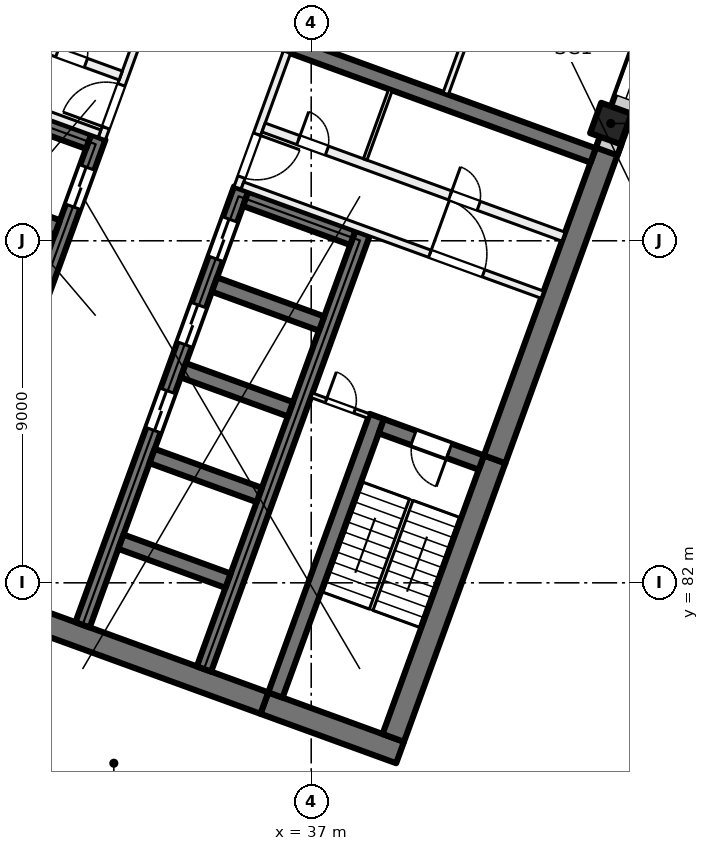
"""IFC4 building model, lengths in metres.
Left out: names, types, materials, properties, quantities, classifications, styles, units other than length and angle.
Written with IfcOpenShell. Run it as: python <this file> out.ifc"""

import sys

from ifc_helpers import new_model, si_unit, direction, frame, frame_2d, origin, origin_2d, place, context, subcontext, project, spatial, rectangle, extrude, element, fill, save


model = new_model("IFC4")
c1 = context("Model", 3, precision=1e-05, world=origin(), true_north=direction((0.0, 1.0)))
c2 = subcontext(c1, "Body", "Model", "MODEL_VIEW")
j1 = project(units=[si_unit("LENGTHUNIT", "METRE"), si_unit("PLANEANGLEUNIT", "RADIAN")], contexts=[c1])
p1 = place(None, origin())
s1 = spatial("IfcSite", under=j1, at=p1, CompositionType="ELEMENT")
p2 = place(p1, origin())
s2 = spatial("IfcBuilding", under=s1, at=p2, CompositionType="ELEMENT")
p3 = place(p2, frame((0.0, 0.0, 117.0)))
s3 = spatial("IfcBuildingStorey", under=s2, at=p3, CompositionType="ELEMENT", Elevation=117.0)
p4 = place(p3, frame((44.884, 94.087, 0.0), z_axis=(0.0, 0.0, 1.0), x_axis=(-0.342020143326, -0.939692620786, 0.0)))
e1 = element("IfcColumn", 1, at=p4, inside=s3, PredefinedType="COLUMN", context=c2, shape_type="SweptSolid", body=[
    extrude(rectangle(XDim=0.85, YDim=0.85, at=origin_2d()), origin(), (0.0, 0.0, 1.0), 4.0),
])
p5 = place(p3, frame((39.338, 77.535, 0.0), z_axis=(0.0, 0.0, 1.0), x_axis=(-0.939701471648, 0.341995824804, 0.0)))
e2 = element("IfcWall", 2, at=p5, inside=s3, PredefinedType="SHEAR", context=c2, shape_type="SweptSolid", body=[
    extrude(rectangle(XDim=3.8, YDim=0.6, at=frame_2d((1.9, 0.0))), origin(), (0.0, 0.0, 1.0), 4.0),
])
p6 = place(p3, frame((35.767, 78.835, 0.0), z_axis=(0.0, 0.0, 1.0), x_axis=(-0.939692894512, 0.342019391267, 0.0)))
e3 = element("IfcWall", 3, at=p6, inside=s3, PredefinedType="SHEAR", context=c2, shape_type="SweptSolid", body=[
    extrude(rectangle(XDim=14.4, YDim=0.6, at=frame_2d((7.2, 0.0))), origin(), (0.0, 0.0, 1.0), 4.0),
])
p7 = place(p3, frame((39.159, 77.92, 0.0), z_axis=(0.0, 0.0, 1.0), x_axis=(0.342016982193, 0.939693771338, 0.0)))
e4 = element("IfcWall", 4, at=p7, inside=s3, PredefinedType="SHEAR", context=c2, shape_type="SweptSolid", body=[
    extrude(rectangle(XDim=7.8, YDim=0.6, at=frame_2d((3.9, 0.0))), origin(), (0.0, 0.0, 1.0), 4.0),
])
p8 = place(p3, frame((41.827, 85.249, 0.0), z_axis=(0.0, 0.0, 1.0), x_axis=(0.342017595281, 0.939693548195, 0.0)))
e5 = element("IfcWall", 5, at=p8, inside=s3, PredefinedType="SHEAR", context=c2, shape_type="SweptSolid", body=[
    extrude(rectangle(XDim=8.925, YDim=0.6, at=frame_2d((4.462, 0.0))), origin(), (0.0, 0.0, 1.0), 4.0),
])
p9 = place(p3, frame((36.058, 79.048, 0.0), z_axis=(0.0, 0.0, 1.0), x_axis=(0.342016982193, 0.939693771338, 0.0)))
e6 = element("IfcWall", 6, at=p9, inside=s3, PredefinedType="SHEAR", context=c2, shape_type="SweptSolid", body=[
    extrude(rectangle(XDim=7.8, YDim=0.4, at=frame_2d((3.9, 0.0))), origin(), (0.0, 0.0, 1.0), 4.0),
])
p10 = place(p3, frame((41.476, 85.164, 0.0), z_axis=(0.0, 0.0, 1.0), x_axis=(-0.939678810556, 0.342058084236, 0.0)))
e7 = element("IfcWall", 7, at=p10, inside=s3, PredefinedType="SHEAR", context=c2, shape_type="SweptSolid", body=[
    extrude(rectangle(XDim=2.8, YDim=0.4, at=frame_2d((1.4, 0.0))), origin(), (0.0, 0.0, 1.0), 4.0),
])
p11 = place(p10, frame((0.9, 0.0, 0.0)))
e8 = element("IfcOpeningElement", 8, at=p11, cuts=e7, PredefinedType="OPENING", context=c2, shape_type="SweptSolid", body=[
    extrude(rectangle(XDim=1.0, YDim=2.1, at=frame_2d((0.5, 1.05))), frame((0.0, 0.21, 0.0), z_axis=(0.0, -1.0, 0.0), x_axis=(1.0, 0.0, 0.0)), (0.0, 0.0, 1.0), 0.42),
])
p12 = place(p3, frame((30.984, 80.895, 0.0), z_axis=(0.0, 0.0, 1.0), x_axis=(0.342021021735, 0.939692301071, 0.0)))
e9 = element("IfcWall", 9, at=p12, inside=s3, PredefinedType="SHEAR", context=c2, shape_type="SweptSolid", body=[
    extrude(rectangle(XDim=12.2, YDim=0.4, at=frame_2d((6.1, 0.0))), origin(), (0.0, 0.0, 1.0), 4.0),
])
p13 = place(p12, frame((5.45, 0.0, 0.0)))
e10 = element("IfcOpeningElement", 10, at=p13, cuts=e9, PredefinedType="OPENING", context=c2, shape_type="SweptSolid", body=[
    extrude(rectangle(XDim=1.1, YDim=2.1, at=frame_2d((0.55, 1.05))), frame((0.0, 0.21, 0.0), z_axis=(0.0, -1.0, 0.0), x_axis=(1.0, 0.0, 0.0)), (0.0, 0.0, 1.0), 0.42),
])
p14 = place(p12, frame((7.85, 0.0, 0.0)))
e11 = element("IfcOpeningElement", 11, at=p14, cuts=e9, PredefinedType="OPENING", context=c2, shape_type="SweptSolid", body=[
    extrude(rectangle(XDim=1.1, YDim=2.1, at=frame_2d((0.55, 1.05))), frame((0.0, 0.21, 0.0), z_axis=(0.0, -1.0, 0.0), x_axis=(1.0, 0.0, 0.0)), (0.0, 0.0, 1.0), 0.42),
])
p15 = place(p12, frame((10.25, 0.0, 0.0)))
e12 = element("IfcOpeningElement", 12, at=p15, cuts=e9, PredefinedType="OPENING", context=c2, shape_type="SweptSolid", body=[
    extrude(rectangle(XDim=1.1, YDim=2.1, at=frame_2d((0.55, 1.05))), frame((0.0, 0.21, 0.0), z_axis=(0.0, -1.0, 0.0), x_axis=(1.0, 0.0, 0.0)), (0.0, 0.0, 1.0), 0.42),
])
p16 = place(p3, frame((34.178, 79.732, 0.0), z_axis=(0.0, 0.0, 1.0), x_axis=(0.342014590177, 0.939694641948, 0.0)))
e13 = element("IfcWall", 13, at=p16, inside=s3, PredefinedType="SHEAR", context=c2, shape_type="SweptSolid", body=[
    extrude(rectangle(XDim=12.2, YDim=0.4, at=frame_2d((6.1, 0.0))), origin(), (0.0, 0.0, 1.0), 4.0),
])
for number, where, z_axis, x_axis in (
    (14, (34.812, 82.056, 0.0), (0.0, 0.0, 1.0), (-0.94, 0.342, 0.0)),
    (15, (35.632, 84.311, 0.0), (0.0, 0.0, 1.0), (-0.94, 0.342, 0.0)),
    (16, (36.453, 86.566, 0.0), (0.0, 0.0, 1.0), (-0.94, 0.342, 0.0)),
    (17, (37.274, 88.822, 0.0), (0.0, 0.0, 1.0), (-0.94, 0.342, 0.0)),
):
    element("IfcWall", number, at=place(p3, frame(where, z_axis=z_axis, x_axis=x_axis)), inside=s3, PredefinedType="SHEAR", context=c2, shape_type="SweptSolid", body=[
        extrude(rectangle(XDim=3.0, YDim=0.4, at=frame_2d((1.5, 0.0))), origin(), (0.0, 0.0, 1.0), 4.0),
    ])
p17 = place(p3, frame((38.095, 91.077, 0.0), z_axis=(0.0, 0.0, 1.0), x_axis=(-0.939676934218, 0.342063238742, 0.0)))
e18 = element("IfcWall", 18, at=p17, inside=s3, PredefinedType="SHEAR", context=c2, shape_type="SweptSolid", body=[
    extrude(rectangle(XDim=3.0, YDim=0.4, at=frame_2d((1.5, 0.0))), origin(), (0.0, 0.0, 1.0), 4.0),
])
p18 = place(p3, frame((27.225, 82.263, 0.0), z_axis=(0.0, 0.0, 1.0), x_axis=(0.342014590177, 0.939694641948, 0.0)))
e19 = element("IfcWall", 19, at=p18, inside=s3, PredefinedType="SHEAR", context=c2, shape_type="SweptSolid", body=[
    extrude(rectangle(XDim=12.2, YDim=0.4, at=frame_2d((6.1, 0.0))), origin(), (0.0, 0.0, 1.0), 4.0),
])
p19 = place(p18, frame((10.25, 0.0, 0.0)))
e20 = element("IfcOpeningElement", 20, at=p19, cuts=e19, PredefinedType="OPENING", context=c2, shape_type="SweptSolid", body=[
    extrude(rectangle(XDim=1.1, YDim=2.1, at=frame_2d((0.55, 1.05))), frame((0.0, 0.21, 0.0), z_axis=(0.0, -1.0, 0.0), x_axis=(1.0, 0.0, 0.0)), (0.0, 0.0, 1.0), 0.42),
])
p20 = place(p18, frame((0.6, 0.0, 0.0)))
e21 = element("IfcOpeningElement", 21, at=p20, cuts=e19, PredefinedType="OPENING", context=c2, shape_type="SweptSolid", body=[
    extrude(rectangle(XDim=1.0, YDim=2.1, at=frame_2d((0.5, 1.05))), frame((0.0, 0.21, 0.0), z_axis=(0.0, -1.0, 0.0), x_axis=(1.0, 0.0, 0.0)), (0.0, 0.0, 1.0), 0.42),
])
for number, where, z_axis, x_axis in (
    (22, (30.32, 91.353, 0.0), (0.0, 0.0, 1.0), (-0.94, 0.342, 0.0)),
    (23, (31.141, 93.608, 0.0), (0.0, 0.0, 1.0), (-0.94, 0.342, 0.0)),
):
    element("IfcWall", number, at=place(p3, frame(where, z_axis=z_axis, x_axis=x_axis)), inside=s3, PredefinedType="SHEAR", context=c2, shape_type="SweptSolid", body=[
        extrude(rectangle(XDim=3.0, YDim=0.4, at=frame_2d((1.5, 0.0))), origin(), (0.0, 0.0, 1.0), 4.0),
    ])
p21 = place(p3, frame((44.418, 93.245, 0.0), z_axis=(0.0, 0.0, 1.0), x_axis=(-0.93969060187, 0.342025690201, 0.0)))
e24 = element("IfcWall", 24, at=p21, inside=s3, PredefinedType="SHEAR", context=c2, shape_type="SweptSolid", body=[
    extrude(rectangle(XDim=8.6, YDim=0.4, at=frame_2d((4.3, 0.0))), origin(), (0.0, 0.0, 1.0), 4.0),
])
p22 = place(p3, frame((52.212, 113.783, 0.0), z_axis=(0.0, 0.0, 1.0), x_axis=(-0.34202521188, -0.939690775968, 0.0)))
e25 = element("IfcWall", 25, at=p22, inside=s3, PredefinedType="SOLIDWALL", context=c2, shape_type="SweptSolid", body=[
    extrude(rectangle(XDim=21.745, YDim=0.6, at=frame_2d((10.873, 0.0))), origin(), (0.0, 0.0, 1.0), 3.625),
])
p23 = place(p22, frame((4.365, 0.0, 0.0)))
e26 = element("IfcOpeningElement", 26, at=p23, cuts=e25, PredefinedType="OPENING", context=c2, shape_type="SweptSolid", body=[
    extrude(rectangle(XDim=1.8, YDim=2.4, at=frame_2d((0.9, 1.2))), frame((0.0, 0.31, 0.0), z_axis=(0.0, -1.0, 0.0), x_axis=(1.0, 0.0, 0.0)), (0.0, 0.0, 1.0), 0.62),
])
p24 = place(p22, frame((8.265, 0.0, 0.9)))
e27 = element("IfcOpeningElement", 27, at=p24, cuts=e25, PredefinedType="OPENING", context=c2, shape_type="SweptSolid", body=[
    extrude(rectangle(XDim=3.0, YDim=2.4, at=frame_2d((1.5, 1.2))), frame((0.0, 0.31, 0.0), z_axis=(0.0, -1.0, 0.0), x_axis=(1.0, 0.0, 0.0)), (0.0, 0.0, 1.0), 0.62),
])
p25 = place(p22, frame((12.765, 0.0, 0.9)))
e28 = element("IfcOpeningElement", 28, at=p25, cuts=e25, PredefinedType="OPENING", context=c2, shape_type="SweptSolid", body=[
    extrude(rectangle(XDim=3.0, YDim=2.4, at=frame_2d((1.5, 1.2))), frame((0.0, 0.31, 0.0), z_axis=(0.0, -1.0, 0.0), x_axis=(1.0, 0.0, 0.0)), (0.0, 0.0, 1.0), 0.62),
])
p26 = place(p22, frame((17.265, 0.0, 0.9)))
e29 = element("IfcOpeningElement", 29, at=p26, cuts=e25, PredefinedType="OPENING", context=c2, shape_type="SweptSolid", body=[
    extrude(rectangle(XDim=3.0, YDim=2.4, at=frame_2d((1.5, 1.2))), frame((0.0, 0.31, 0.0), z_axis=(0.0, -1.0, 0.0), x_axis=(1.0, 0.0, 0.0)), (0.0, 0.0, 1.0), 0.62),
])
p27 = place(p3, frame((31.491, 93.693, 0.0), z_axis=(0.0, 0.0, 1.0), x_axis=(0.341995824804, 0.939701471648, 0.0)))
e30 = element("IfcWall", 30, at=p27, inside=s3, PredefinedType="PARTITIONING", context=c2, shape_type="SweptSolid", body=[
    extrude(rectangle(XDim=3.8, YDim=0.2, at=frame_2d((1.9, 0.0))), origin(), (0.0, 0.0, 1.0), 3.625),
])
p28 = place(p27, frame((0.3, 0.0, 0.0)))
e31 = element("IfcOpeningElement", 31, at=p28, cuts=e30, PredefinedType="OPENING", context=c2, shape_type="SweptSolid", body=[
    extrude(rectangle(XDim=1.2, YDim=2.1, at=frame_2d((0.6, 1.05))), frame((0.0, 0.11, 0.0), z_axis=(0.0, -1.0, 0.0), x_axis=(1.0, 0.0, 0.0)), (0.0, 0.0, 1.0), 0.22),
])
p29 = place(p3, frame((23.538, 96.694, 0.0), z_axis=(0.0, 0.0, 1.0), x_axis=(0.939691552312, -0.342023078919, 0.0)))
e32 = element("IfcWall", 32, at=p29, inside=s3, PredefinedType="PARTITIONING", context=c2, shape_type="SweptSolid", body=[
    extrude(rectangle(XDim=8.4, YDim=0.2, at=frame_2d((4.2, 0.0))), origin(), (0.0, 0.0, 1.0), 3.625),
])
p30 = place(p29, frame((1.65, 0.0, 0.0)))
e33 = element("IfcOpeningElement", 33, at=p30, cuts=e32, PredefinedType="OPENING", context=c2, shape_type="SweptSolid", body=[
    extrude(rectangle(XDim=1.5, YDim=2.1, at=frame_2d((0.75, 1.05))), frame((0.0, 0.11, 0.0), z_axis=(0.0, -1.0, 0.0), x_axis=(1.0, 0.0, 0.0)), (0.0, 0.0, 1.0), 0.22),
])
p31 = place(p3, frame((24.094, 98.221, 0.0), z_axis=(0.0, 0.0, 1.0), x_axis=(0.939691552312, -0.342023078919, 0.0)))
e34 = element("IfcWall", 34, at=p31, inside=s3, PredefinedType="PARTITIONING", context=c2, shape_type="SweptSolid", body=[
    extrude(rectangle(XDim=8.4, YDim=0.25, at=frame_2d((4.2, 0.0))), origin(), (0.0, 0.0, 1.0), 3.625),
])
p32 = place(p31, frame((6.625, 0.0, 0.0)))
e35 = element("IfcOpeningElement", 35, at=p32, cuts=e34, PredefinedType="OPENING", context=c2, shape_type="SweptSolid", body=[
    extrude(rectangle(XDim=0.8, YDim=2.1, at=frame_2d((0.4, 1.05))), frame((0.0, 0.135, 0.0), z_axis=(0.0, -1.0, 0.0), x_axis=(1.0, 0.0, 0.0)), (0.0, 0.0, 1.0), 0.27),
])
p33 = place(p31, frame((2.375, 0.0, 0.0)))
e36 = element("IfcOpeningElement", 36, at=p33, cuts=e34, PredefinedType="OPENING", context=c2, shape_type="SweptSolid", body=[
    extrude(rectangle(XDim=0.8, YDim=2.1, at=frame_2d((0.4, 1.05))), frame((0.0, 0.135, 0.0), z_axis=(0.0, -1.0, 0.0), x_axis=(1.0, 0.0, 0.0)), (0.0, 0.0, 1.0), 0.27),
])
p34 = place(p3, frame((36.362, 95.964, 0.0), z_axis=(0.0, 0.0, 1.0), x_axis=(-0.341995824804, -0.939701471648, 0.0)))
e37 = element("IfcWall", 37, at=p34, inside=s3, PredefinedType="PARTITIONING", context=c2, shape_type="SweptSolid", body=[
    extrude(rectangle(XDim=3.8, YDim=0.2, at=frame_2d((1.9, 0.0))), origin(), (0.0, 0.0, 1.0), 3.625),
])
p35 = place(p34, frame((2.3, 0.0, 0.0)))
e38 = element("IfcOpeningElement", 38, at=p35, cuts=e37, PredefinedType="OPENING", context=c2, shape_type="SweptSolid", body=[
    extrude(rectangle(XDim=1.2, YDim=2.1, at=frame_2d((0.6, 1.05))), frame((0.0, 0.11, 0.0), z_axis=(0.0, -1.0, 0.0), x_axis=(1.0, 0.0, 0.0)), (0.0, 0.0, 1.0), 0.22),
])
p36 = place(p3, frame((35.19, 92.453, 0.0), z_axis=(0.0, 0.0, 1.0), x_axis=(0.939691552312, -0.342023078919, 0.0)))
e39 = element("IfcWall", 39, at=p36, inside=s3, PredefinedType="PARTITIONING", context=c2, shape_type="SweptSolid", body=[
    extrude(rectangle(XDim=8.4, YDim=0.2, at=frame_2d((4.2, 0.0))), origin(), (0.0, 0.0, 1.0), 3.625),
])
p37 = place(p36, frame((5.25, 0.0, 0.0)))
e40 = element("IfcOpeningElement", 40, at=p37, cuts=e39, PredefinedType="OPENING", context=c2, shape_type="SweptSolid", body=[
    extrude(rectangle(XDim=1.5, YDim=2.1, at=frame_2d((0.75, 1.05))), frame((0.0, 0.11, 0.0), z_axis=(0.0, -1.0, 0.0), x_axis=(1.0, 0.0, 0.0)), (0.0, 0.0, 1.0), 0.22),
])
p38 = place(p3, frame((35.746, 93.98, 0.0), z_axis=(0.0, 0.0, 1.0), x_axis=(0.939691552312, -0.342023078919, 0.0)))
e41 = element("IfcWall", 41, at=p38, inside=s3, PredefinedType="PARTITIONING", context=c2, shape_type="SweptSolid", body=[
    extrude(rectangle(XDim=8.4, YDim=0.25, at=frame_2d((4.2, 0.0))), origin(), (0.0, 0.0, 1.0), 3.625),
])
p39 = place(p38, frame((0.975, 0.0, 0.0)))
e42 = element("IfcOpeningElement", 42, at=p39, cuts=e41, PredefinedType="OPENING", context=c2, shape_type="SweptSolid", body=[
    extrude(rectangle(XDim=0.8, YDim=2.1, at=frame_2d((0.4, 1.05))), frame((0.0, 0.135, 0.0), z_axis=(0.0, -1.0, 0.0), x_axis=(1.0, 0.0, 0.0)), (0.0, 0.0, 1.0), 0.27),
])
p40 = place(p38, frame((5.225, 0.0, 0.0)))
e43 = element("IfcOpeningElement", 43, at=p40, cuts=e41, PredefinedType="OPENING", context=c2, shape_type="SweptSolid", body=[
    extrude(rectangle(XDim=0.8, YDim=2.1, at=frame_2d((0.4, 1.05))), frame((0.0, 0.135, 0.0), z_axis=(0.0, -1.0, 0.0), x_axis=(1.0, 0.0, 0.0)), (0.0, 0.0, 1.0), 0.27),
])
p41 = place(p3, frame((37.013, 86.935, 0.0), z_axis=(0.0, 0.0, 1.0), x_axis=(0.939659694648, -0.342110593602, 0.0)))
e44 = element("IfcWall", 44, at=p41, inside=s3, PredefinedType="PARTITIONING", context=c2, shape_type="SweptSolid", body=[
    extrude(rectangle(XDim=1.6, YDim=0.125, at=frame_2d((0.8, 0.0))), origin(), (0.0, 0.0, 1.0), 3.625),
])
p42 = place(p41, frame((0.4, 0.0, 0.0)))
e45 = element("IfcOpeningElement", 45, at=p42, cuts=e44, PredefinedType="OPENING", context=c2, shape_type="SweptSolid", body=[
    extrude(rectangle(XDim=0.8, YDim=2.1, at=frame_2d((0.4, 1.05))), frame((0.0, 0.073, 0.0), z_axis=(0.0, -1.0, 0.0), x_axis=(1.0, 0.0, 0.0)), (0.0, 0.0, 1.0), 0.145),
])
p43 = place(p3, frame((39.087, 94.973, 0.0), z_axis=(0.0, 0.0, 1.0), x_axis=(-0.342024501273, -0.939691034611, 0.0)))
e46 = element("IfcWall", 46, at=p43, inside=s3, PredefinedType="PARTITIONING", context=c2, shape_type="SweptSolid", body=[
    extrude(rectangle(XDim=1.95, YDim=0.1, at=frame_2d((0.975, 0.0))), origin(), (0.0, 0.0, 1.0), 3.625),
])
p44 = place(p3, frame((40.539, 94.87, 0.0), z_axis=(0.0, 0.0, 1.0), x_axis=(0.342082231415, 0.939670020247, 0.0)))
e47 = element("IfcWall", 47, at=p44, inside=s3, PredefinedType="PARTITIONING", context=c2, shape_type="SweptSolid", body=[
    extrude(rectangle(XDim=9.825, YDim=0.15, at=frame_2d((4.912, 0.0))), origin(), (0.0, 0.0, 1.0), 3.625),
])
p45 = place(p44, frame((2.125, 0.0, 0.0)))
e48 = element("IfcOpeningElement", 48, at=p45, cuts=e47, PredefinedType="OPENING", context=c2, shape_type="SweptSolid", body=[
    extrude(rectangle(XDim=1.0, YDim=2.1, at=frame_2d((0.5, 1.05))), frame((0.0, 0.085, 0.0), z_axis=(0.0, -1.0, 0.0), x_axis=(1.0, 0.0, 0.0)), (0.0, 0.0, 1.0), 0.17),
])
p46 = place(p44, frame((7.0, 0.0, 0.0)))
e49 = element("IfcOpeningElement", 49, at=p46, cuts=e47, PredefinedType="OPENING", context=c2, shape_type="SweptSolid", body=[
    extrude(rectangle(XDim=1.0, YDim=2.1, at=frame_2d((0.5, 1.05))), frame((0.0, 0.085, 0.0), z_axis=(0.0, -1.0, 0.0), x_axis=(1.0, 0.0, 0.0)), (0.0, 0.0, 1.0), 0.17),
])
p47 = place(p26, origin())
e50 = element("IfcWindow", 50, at=p47, inside=s3, PartitioningType="SINGLE_PANEL", PredefinedType="WINDOW", context=c2, shape_type="SweptSolid", body=[
    extrude(rectangle(XDim=3.0, YDim=2.4, at=frame_2d((1.5, 1.2))), frame((0.0, 0.03, 0.0), z_axis=(0.0, -1.0, 0.0), x_axis=(1.0, 0.0, 0.0)), (0.0, 0.0, 1.0), 0.06),
])
fill(e29, e50)
p48 = place(p19, origin())
e51 = element("IfcDoor", 51, at=p48, inside=s3, OperationType="DOUBLE_DOOR_SLIDING", PredefinedType="DOOR", context=c2, shape_type="SweptSolid", body=[
    extrude(rectangle(XDim=1.1, YDim=2.1, at=frame_2d((0.55, 1.05))), frame((0.0, 0.025, 0.0), z_axis=(0.0, -1.0, 0.0), x_axis=(1.0, 0.0, 0.0)), (0.0, 0.0, 1.0), 0.05),
])
fill(e20, e51)
p49 = place(p13, origin())
e52 = element("IfcDoor", 52, at=p49, inside=s3, OperationType="DOUBLE_DOOR_SLIDING", PredefinedType="DOOR", context=c2, shape_type="SweptSolid", body=[
    extrude(rectangle(XDim=1.1, YDim=2.1, at=frame_2d((0.55, 1.05))), frame((0.0, 0.025, 0.0), z_axis=(0.0, -1.0, 0.0), x_axis=(1.0, 0.0, 0.0)), (0.0, 0.0, 1.0), 0.05),
])
fill(e10, e52)
p50 = place(p14, origin())
e53 = element("IfcDoor", 53, at=p50, inside=s3, OperationType="DOUBLE_DOOR_SLIDING", PredefinedType="DOOR", context=c2, shape_type="SweptSolid", body=[
    extrude(rectangle(XDim=1.1, YDim=2.1, at=frame_2d((0.55, 1.05))), frame((0.0, 0.025, 0.0), z_axis=(0.0, -1.0, 0.0), x_axis=(1.0, 0.0, 0.0)), (0.0, 0.0, 1.0), 0.05),
])
fill(e11, e53)
p51 = place(p15, origin())
e54 = element("IfcDoor", 54, at=p51, inside=s3, OperationType="DOUBLE_DOOR_SLIDING", PredefinedType="DOOR", context=c2, shape_type="SweptSolid", body=[
    extrude(rectangle(XDim=1.1, YDim=2.1, at=frame_2d((0.55, 1.05))), frame((0.0, 0.025, 0.0), z_axis=(0.0, -1.0, 0.0), x_axis=(1.0, 0.0, 0.0)), (0.0, 0.0, 1.0), 0.05),
])
fill(e12, e54)
p52 = place(p28, origin())
e55 = element("IfcDoor", 55, at=p52, inside=s3, OperationType="DOUBLE_DOOR_SINGLE_SWING", PredefinedType="DOOR", context=c2, shape_type="SweptSolid", body=[
    extrude(rectangle(XDim=1.2, YDim=2.1, at=frame_2d((0.6, 1.05))), frame((0.0, 0.025, 0.0), z_axis=(0.0, -1.0, 0.0), x_axis=(1.0, 0.0, 0.0)), (0.0, 0.0, 1.0), 0.05),
])
fill(e31, e55)
p53 = place(p32, origin())
e56 = element("IfcDoor", 56, at=p53, inside=s3, OperationType="SINGLE_SWING_LEFT", PredefinedType="DOOR", context=c2, shape_type="SweptSolid", body=[
    extrude(rectangle(XDim=0.8, YDim=2.1, at=frame_2d((0.4, 1.05))), frame((0.0, 0.025, 0.0), z_axis=(0.0, -1.0, 0.0), x_axis=(1.0, 0.0, 0.0)), (0.0, 0.0, 1.0), 0.05),
])
fill(e35, e56)
p54 = place(p35, origin())
e57 = element("IfcDoor", 57, at=p54, inside=s3, OperationType="DOUBLE_DOOR_SINGLE_SWING", PredefinedType="DOOR", context=c2, shape_type="SweptSolid", body=[
    extrude(rectangle(XDim=1.2, YDim=2.1, at=frame_2d((0.6, 1.05))), frame((0.0, 0.025, 0.0), z_axis=(0.0, -1.0, 0.0), x_axis=(1.0, 0.0, 0.0)), (0.0, 0.0, 1.0), 0.05),
])
fill(e38, e57)
p55 = place(p37, origin())
e58 = element("IfcDoor", 58, at=p55, inside=s3, OperationType="DOUBLE_DOOR_SINGLE_SWING", PredefinedType="DOOR", context=c2, shape_type="SweptSolid", body=[
    extrude(rectangle(XDim=1.5, YDim=2.1, at=frame_2d((0.75, 1.05))), frame((0.0, 0.025, 0.0), z_axis=(0.0, -1.0, 0.0), x_axis=(1.0, 0.0, 0.0)), (0.0, 0.0, 1.0), 0.05),
])
fill(e40, e58)
p56 = place(p11, origin())
e59 = element("IfcDoor", 59, at=p56, inside=s3, OperationType="SINGLE_SWING_RIGHT", PredefinedType="DOOR", context=c2, shape_type="SweptSolid", body=[
    extrude(rectangle(XDim=1.0, YDim=2.1, at=frame_2d((0.5, 1.05))), frame((0.0, 0.025, 0.0), z_axis=(0.0, -1.0, 0.0), x_axis=(1.0, 0.0, 0.0)), (0.0, 0.0, 1.0), 0.05),
])
fill(e8, e59)
p57 = place(p42, origin())
e60 = element("IfcDoor", 60, at=p57, inside=s3, OperationType="SINGLE_SWING_LEFT", PredefinedType="DOOR", context=c2, shape_type="SweptSolid", body=[
    extrude(rectangle(XDim=0.8, YDim=2.1, at=frame_2d((0.4, 1.05))), frame((0.0, 0.025, 0.0), z_axis=(0.0, -1.0, 0.0), x_axis=(1.0, 0.0, 0.0)), (0.0, 0.0, 1.0), 0.05),
])
fill(e45, e60)
p58 = place(p39, origin())
e61 = element("IfcDoor", 61, at=p58, inside=s3, OperationType="SINGLE_SWING_RIGHT", PredefinedType="DOOR", context=c2, shape_type="SweptSolid", body=[
    extrude(rectangle(XDim=0.8, YDim=2.1, at=frame_2d((0.4, 1.05))), frame((0.0, 0.025, 0.0), z_axis=(0.0, -1.0, 0.0), x_axis=(1.0, 0.0, 0.0)), (0.0, 0.0, 1.0), 0.05),
])
fill(e42, e61)
p59 = place(p40, origin())
e62 = element("IfcDoor", 62, at=p59, inside=s3, OperationType="SINGLE_SWING_LEFT", PredefinedType="DOOR", context=c2, shape_type="SweptSolid", body=[
    extrude(rectangle(XDim=0.8, YDim=2.1, at=frame_2d((0.4, 1.05))), frame((0.0, 0.025, 0.0), z_axis=(0.0, -1.0, 0.0), x_axis=(1.0, 0.0, 0.0)), (0.0, 0.0, 1.0), 0.05),
])
fill(e43, e62)
save(model, sys.argv[1])
